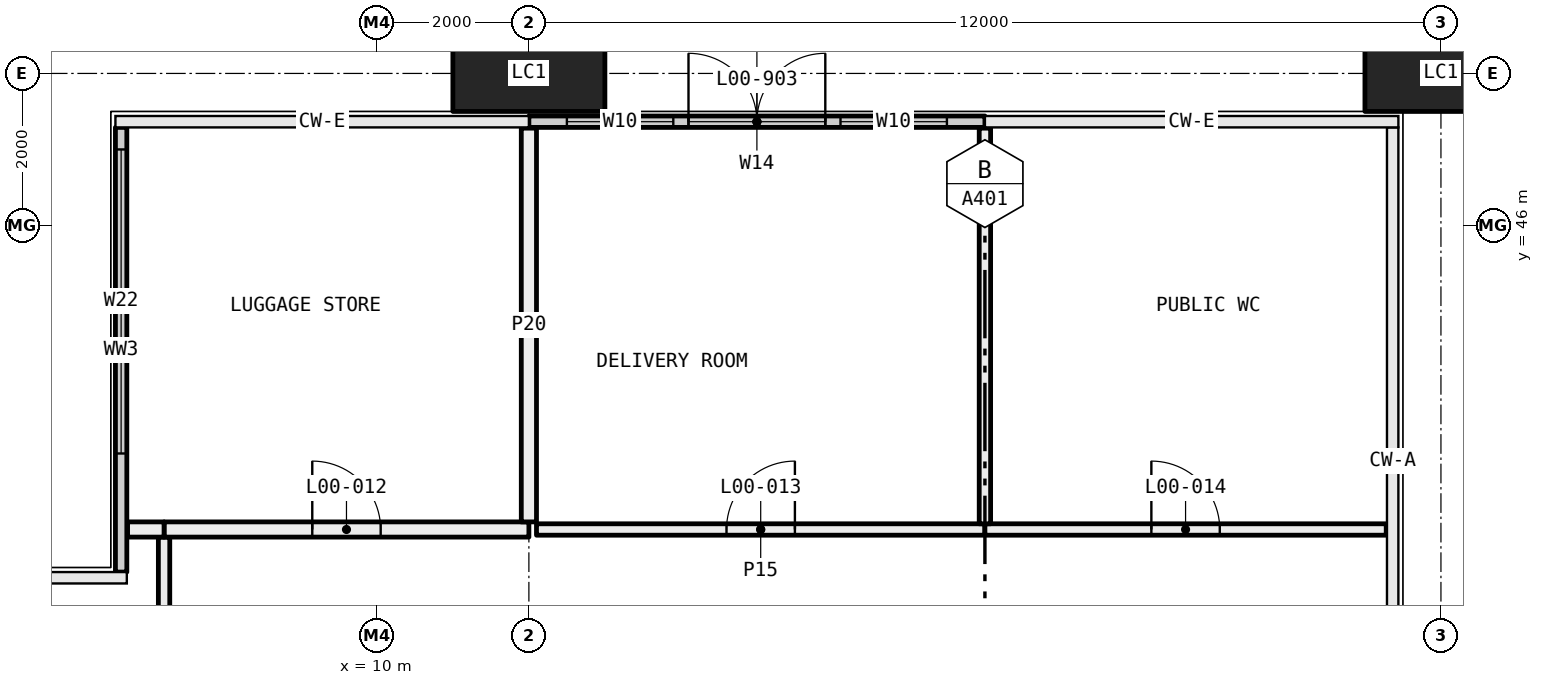
"""IFC4 building model, lengths in metres.
Left out: names, types, materials, properties, quantities, classifications, styles, units other than length and angle.
Written with IfcOpenShell. Run it as: python <this file> out.ifc"""

import sys

from ifc_helpers import new_model, si_unit, direction, frame, frame_2d, origin, origin_2d, place, context, subcontext, project, spatial, rectangle, hollow_rectangle, extrude, element, fill, save


model = new_model("IFC4")
c1 = context("Model", 3, precision=1e-05, world=origin(), true_north=direction((0.0, 1.0)))
c2 = subcontext(c1, "Body", "Model", "MODEL_VIEW")
j1 = project(units=[si_unit("LENGTHUNIT", "METRE"), si_unit("PLANEANGLEUNIT", "RADIAN")], contexts=[c1])
p1 = place(None, origin())
s1 = spatial("IfcSite", under=j1, at=p1, CompositionType="ELEMENT")
p2 = place(p1, origin())
s2 = spatial("IfcBuilding", under=s1, at=p2, CompositionType="ELEMENT")
p3 = place(p2, origin())
s3 = spatial("IfcBuildingStorey", under=s2, at=p3, CompositionType="ELEMENT", Elevation=0.0)
for number, where, z_axis, x_axis in (
    (1, (12.0, 48.0, -0.9), (0.0, 0.0, 1.0), (1.0, 0.0, 0.0)),
    (2, (24.0, 48.0, -0.9), (0.0, 0.0, 1.0), (1.0, 0.0, 0.0)),
):
    element("IfcColumn", number, at=place(p3, frame(where, z_axis=z_axis, x_axis=x_axis)), inside=s3, PredefinedType="COLUMN", context=c2, shape_type="SweptSolid", body=[
        extrude(hollow_rectangle(XDim=2.0, YDim=1.0, WallThickness=0.08, at=origin_2d()), origin(), (0.0, 0.0, 1.0), 6.5),
    ])
p4 = place(p3, frame((12.0, 47.365, 0.0), z_axis=(0.0, 0.0, 1.0), x_axis=(1.0, 0.0, 0.0)))
e3 = element("IfcWall", 3, at=p4, inside=s3, PredefinedType="ELEMENTEDWALL", context=c2, shape_type="SweptSolid", body=[
    extrude(rectangle(XDim=6.0, YDim=0.15, at=frame_2d((3.0, 0.0))), origin(), (0.0, 0.0, 1.0), 5.6),
])
p5 = place(p4, frame((0.5, 0.0, 0.45)))
e4 = element("IfcOpeningElement", 4, at=p5, cuts=e3, PredefinedType="OPENING", context=c2, shape_type="SweptSolid", body=[
    extrude(rectangle(XDim=1.4, YDim=5.1, at=frame_2d((0.7, 2.55))), frame((0.0, 0.085, 0.0), z_axis=(0.0, -1.0, 0.0), x_axis=(1.0, 0.0, 0.0)), (0.0, 0.0, 1.0), 0.17),
])
p6 = place(p4, frame((4.1, 0.0, 0.45)))
e5 = element("IfcOpeningElement", 5, at=p6, cuts=e3, PredefinedType="OPENING", context=c2, shape_type="SweptSolid", body=[
    extrude(rectangle(XDim=1.4, YDim=5.1, at=frame_2d((0.7, 2.55))), frame((0.0, 0.085, 0.0), z_axis=(0.0, -1.0, 0.0), x_axis=(1.0, 0.0, 0.0)), (0.0, 0.0, 1.0), 0.17),
])
p7 = place(p4, frame((2.1, 0.0, 0.0)))
e6 = element("IfcOpeningElement", 6, at=p7, cuts=e3, PredefinedType="OPENING", context=c2, shape_type="SweptSolid", body=[
    extrude(rectangle(XDim=1.8, YDim=2.4, at=frame_2d((0.9, 1.2))), frame((0.0, 0.085, 0.0), z_axis=(0.0, -1.0, 0.0), x_axis=(1.0, 0.0, 0.0)), (0.0, 0.0, 1.0), 0.17),
])
p8 = place(p4, frame((2.1, 0.0, 2.6)))
e7 = element("IfcOpeningElement", 7, at=p8, cuts=e3, PredefinedType="OPENING", context=c2, shape_type="SweptSolid", body=[
    extrude(rectangle(XDim=1.8, YDim=2.95, at=frame_2d((0.9, 1.475))), frame((0.0, 0.085, 0.0), z_axis=(0.0, -1.0, 0.0), x_axis=(1.0, 0.0, 0.0)), (0.0, 0.0, 1.0), 0.17),
])
p9 = place(p3, frame((6.635, 41.44, 0.0), z_axis=(0.0, 0.0, 1.0), x_axis=(0.0, 1.0, 0.0)))
e8 = element("IfcWall", 8, at=p9, inside=s3, PredefinedType="ELEMENTEDWALL", context=c2, shape_type="SweptSolid", body=[
    extrude(rectangle(XDim=5.85, YDim=0.15, at=frame_2d((2.925, 0.0))), origin(), (0.0, 0.0, 1.0), 5.6),
])
p10 = place(p9, frame((1.56, 0.0, 0.45)))
e9 = element("IfcOpeningElement", 9, at=p10, cuts=e8, PredefinedType="OPENING", context=c2, shape_type="SweptSolid", body=[
    extrude(rectangle(XDim=4.0, YDim=5.1, at=frame_2d((2.0, 2.55))), frame((0.0, 0.085, 0.0), z_axis=(0.0, -1.0, 0.0), x_axis=(1.0, 0.0, 0.0)), (0.0, 0.0, 1.0), 0.17),
])
p11 = place(p3, frame((7.2, 41.9, 0.0), z_axis=(0.0, 0.0, 1.0), x_axis=(0.0, -1.0, 0.0)))
e10 = element("IfcWall", 10, at=p11, inside=s3, PredefinedType="PARTITIONING", context=c2, shape_type="SweptSolid", body=[
    extrude(rectangle(XDim=5.8, YDim=0.15, at=frame_2d((2.9, 0.0))), origin(), (0.0, 0.0, 1.0), 5.6),
])
p12 = place(p11, frame((2.45, 0.0, 0.0)))
e11 = element("IfcOpeningElement", 11, at=p12, cuts=e10, PredefinedType="OPENING", context=c2, shape_type="SweptSolid", body=[
    extrude(rectangle(XDim=0.9, YDim=2.1, at=frame_2d((0.45, 1.05))), frame((0.0, 0.085, 0.0), z_axis=(0.0, -1.0, 0.0), x_axis=(1.0, 0.0, 0.0)), (0.0, 0.0, 1.0), 0.17),
])
p13 = place(p3, frame((12.0, 42.0, 0.0), z_axis=(0.0, 0.0, 1.0), x_axis=(-1.0, 0.0, 0.0)))
e12 = element("IfcWall", 12, at=p13, inside=s3, PredefinedType="PARTITIONING", context=c2, shape_type="SweptSolid", body=[
    extrude(rectangle(XDim=4.8, YDim=0.2, at=frame_2d((2.4, 0.0))), origin(), (0.0, 0.0, 1.0), 5.6),
])
p14 = place(p13, frame((1.95, 0.0, 0.0)))
e13 = element("IfcOpeningElement", 13, at=p14, cuts=e12, PredefinedType="OPENING", context=c2, shape_type="SweptSolid", body=[
    extrude(rectangle(XDim=0.9, YDim=2.1, at=frame_2d((0.45, 1.05))), frame((0.0, 0.11, 0.0), z_axis=(0.0, -1.0, 0.0), x_axis=(1.0, 0.0, 0.0)), (0.0, 0.0, 1.0), 0.22),
])
p15 = place(p3, frame((18.0, 42.0, 0.0), z_axis=(0.0, 0.0, 1.0), x_axis=(-1.0, 0.0, 0.0)))
e14 = element("IfcWall", 14, at=p15, inside=s3, PredefinedType="PARTITIONING", context=c2, shape_type="SweptSolid", body=[
    extrude(rectangle(XDim=5.9, YDim=0.15, at=frame_2d((2.95, 0.0))), origin(), (0.0, 0.0, 1.0), 5.6),
])
p16 = place(p15, frame((2.5, 0.0, 0.0)))
e15 = element("IfcOpeningElement", 15, at=p16, cuts=e14, PredefinedType="OPENING", context=c2, shape_type="SweptSolid", body=[
    extrude(rectangle(XDim=0.9, YDim=2.1, at=frame_2d((0.45, 1.05))), frame((0.0, 0.085, 0.0), z_axis=(0.0, -1.0, 0.0), x_axis=(1.0, 0.0, 0.0)), (0.0, 0.0, 1.0), 0.17),
])
p17 = place(p3, frame((23.28, 42.0, 0.0), z_axis=(0.0, 0.0, 1.0), x_axis=(-1.0, 0.0, 0.0)))
e16 = element("IfcWall", 16, at=p17, inside=s3, PredefinedType="PARTITIONING", context=c2, shape_type="SweptSolid", body=[
    extrude(rectangle(XDim=5.28, YDim=0.15, at=frame_2d((2.64, 0.0))), origin(), (0.0, 0.0, 1.0), 5.6),
])
p18 = place(p17, frame((2.19, 0.0, 0.0)))
e17 = element("IfcOpeningElement", 17, at=p18, cuts=e16, PredefinedType="OPENING", context=c2, shape_type="SweptSolid", body=[
    extrude(rectangle(XDim=0.9, YDim=2.1, at=frame_2d((0.45, 1.05))), frame((0.0, 0.085, 0.0), z_axis=(0.0, -1.0, 0.0), x_axis=(1.0, 0.0, 0.0)), (0.0, 0.0, 1.0), 0.17),
])
p19 = place(p3, frame((7.2, 42.0, 0.0), z_axis=(0.0, 0.0, 1.0), x_axis=(-1.0, 0.0, 0.0)))
e18 = element("IfcWall", 18, at=p19, inside=s3, PredefinedType="PARTITIONING", context=c2, shape_type="SweptSolid", body=[
    extrude(rectangle(XDim=0.48, YDim=0.2, at=frame_2d((0.24, 0.0))), origin(), (0.0, 0.0, 1.0), 5.6),
])
p20 = place(p3, frame((12.0, 42.1, 0.0), z_axis=(0.0, 0.0, 1.0), x_axis=(0.0, 1.0, 0.0)))
e19 = element("IfcWall", 19, at=p20, inside=s3, PredefinedType="PARTITIONING", context=c2, shape_type="SweptSolid", body=[
    extrude(rectangle(XDim=5.18, YDim=0.2, at=frame_2d((2.59, 0.0))), origin(), (0.0, 0.0, 1.0), 5.6),
])
p21 = place(p3, frame((18.0, 42.075, 0.0), z_axis=(0.0, 0.0, 1.0), x_axis=(0.0, 1.0, 0.0)))
e20 = element("IfcWall", 20, at=p21, inside=s3, PredefinedType="PARTITIONING", context=c2, shape_type="SweptSolid", body=[
    extrude(rectangle(XDim=5.205, YDim=0.15, at=frame_2d((2.603, 0.0))), origin(), (0.0, 0.0, 1.0), 5.6),
])
p22 = place(p5, origin())
e21 = element("IfcWindow", 21, at=p22, inside=s3, PartitioningType="SINGLE_PANEL", PredefinedType="WINDOW", context=c2, shape_type="SweptSolid", body=[
    extrude(rectangle(XDim=1.4, YDim=5.1, at=frame_2d((0.7, 2.55))), frame((0.0, 0.03, 0.0), z_axis=(0.0, -1.0, 0.0), x_axis=(1.0, 0.0, 0.0)), (0.0, 0.0, 1.0), 0.06),
])
fill(e4, e21)
p23 = place(p6, origin())
e22 = element("IfcWindow", 22, at=p23, inside=s3, PartitioningType="SINGLE_PANEL", PredefinedType="WINDOW", context=c2, shape_type="SweptSolid", body=[
    extrude(rectangle(XDim=1.4, YDim=5.1, at=frame_2d((0.7, 2.55))), frame((0.0, 0.03, 0.0), z_axis=(0.0, -1.0, 0.0), x_axis=(1.0, 0.0, 0.0)), (0.0, 0.0, 1.0), 0.06),
])
fill(e5, e22)
p24 = place(p7, origin())
e23 = element("IfcDoor", 23, at=p24, inside=s3, OperationType="DOUBLE_DOOR_SINGLE_SWING", PredefinedType="DOOR", context=c2, shape_type="SweptSolid", body=[
    extrude(rectangle(XDim=1.8, YDim=2.4, at=frame_2d((0.9, 1.2))), frame((0.0, 0.025, 0.0), z_axis=(0.0, -1.0, 0.0), x_axis=(1.0, 0.0, 0.0)), (0.0, 0.0, 1.0), 0.05),
])
fill(e6, e23)
p25 = place(p8, origin())
e24 = element("IfcWindow", 24, at=p25, inside=s3, PartitioningType="SINGLE_PANEL", PredefinedType="WINDOW", context=c2, shape_type="SweptSolid", body=[
    extrude(rectangle(XDim=1.8, YDim=2.95, at=frame_2d((0.9, 1.475))), frame((0.0, 0.03, 0.0), z_axis=(0.0, -1.0, 0.0), x_axis=(1.0, 0.0, 0.0)), (0.0, 0.0, 1.0), 0.06),
])
fill(e7, e24)
p26 = place(p10, origin())
e25 = element("IfcWindow", 25, at=p26, inside=s3, PartitioningType="SINGLE_PANEL", PredefinedType="WINDOW", context=c2, shape_type="SweptSolid", body=[
    extrude(rectangle(XDim=4.0, YDim=5.1, at=frame_2d((2.0, 2.55))), frame((0.0, 0.03, 0.0), z_axis=(0.0, -1.0, 0.0), x_axis=(1.0, 0.0, 0.0)), (0.0, 0.0, 1.0), 0.06),
])
fill(e9, e25)
p27 = place(p14, frame((0.9, 0.0, 0.0), x_axis=(-1.0, 0.0, 0.0)))
e26 = element("IfcDoor", 26, at=p27, inside=s3, OperationType="SINGLE_SWING_RIGHT", PredefinedType="DOOR", context=c2, shape_type="SweptSolid", body=[
    extrude(rectangle(XDim=0.9, YDim=2.1, at=frame_2d((0.45, 1.05))), frame((0.0, 0.025, 0.0), z_axis=(0.0, -1.0, 0.0), x_axis=(1.0, 0.0, 0.0)), (0.0, 0.0, 1.0), 0.05),
])
fill(e13, e26)
p28 = place(p16, frame((0.9, 0.0, 0.0), x_axis=(-1.0, 0.0, 0.0)))
e27 = element("IfcDoor", 27, at=p28, inside=s3, OperationType="SINGLE_SWING_LEFT", PredefinedType="DOOR", context=c2, shape_type="SweptSolid", body=[
    extrude(rectangle(XDim=0.9, YDim=2.1, at=frame_2d((0.45, 1.05))), frame((0.0, 0.025, 0.0), z_axis=(0.0, -1.0, 0.0), x_axis=(1.0, 0.0, 0.0)), (0.0, 0.0, 1.0), 0.05),
])
fill(e15, e27)
p29 = place(p18, frame((0.9, 0.0, 0.0), x_axis=(-1.0, 0.0, 0.0)))
e28 = element("IfcDoor", 28, at=p29, inside=s3, OperationType="SINGLE_SWING_RIGHT", PredefinedType="DOOR", context=c2, shape_type="SweptSolid", body=[
    extrude(rectangle(XDim=0.9, YDim=2.1, at=frame_2d((0.45, 1.05))), frame((0.0, 0.025, 0.0), z_axis=(0.0, -1.0, 0.0), x_axis=(1.0, 0.0, 0.0)), (0.0, 0.0, 1.0), 0.05),
])
fill(e17, e28)
save(model, sys.argv[1])
